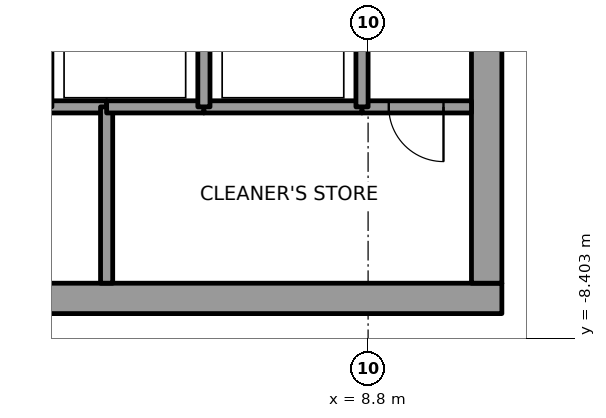
"""IFC4 building model, lengths in metres.
Left out: names, types, materials, properties, quantities, classifications, styles, units other than length and angle.
Written with IfcOpenShell. Run it as: python <this file> out.ifc"""

import sys

from ifc_helpers import new_model, si_unit, direction, frame, frame_2d, origin, place, context, subcontext, project, spatial, rectangle, extrude, element, fill, save


model = new_model("IFC4")
c1 = context("Model", 3, precision=1e-05, world=origin(), true_north=direction((0.0, 1.0)))
c2 = subcontext(c1, "Body", "Model", "MODEL_VIEW")
j1 = project(units=[si_unit("LENGTHUNIT", "METRE"), si_unit("PLANEANGLEUNIT", "RADIAN")], contexts=[c1])
p1 = place(None, origin())
s1 = spatial("IfcSite", under=j1, at=p1, CompositionType="ELEMENT")
p2 = place(p1, origin())
s2 = spatial("IfcBuilding", under=s1, at=p2, CompositionType="ELEMENT")
p3 = place(p2, frame((0.0, 0.0, 295.0)))
s3 = spatial("IfcBuildingStorey", under=s2, at=p3, CompositionType="ELEMENT", Elevation=295.0)
p4 = place(p3, frame((-11.0, -7.75, 0.0), z_axis=(0.0, 0.0, 1.0), x_axis=(1.0, 0.0, 0.0)))
e1 = element("IfcWall", 1, at=p4, inside=s3, PredefinedType="SHEAR", context=c2, shape_type="SweptSolid", body=[
    extrude(rectangle(XDim=22.0, YDim=0.5, at=frame_2d((11.0, 0.0))), origin(), (0.0, 0.0, 1.0), 4.0),
])
p5 = place(p4, frame((10.45, 0.0, 0.0)))
e2 = element("IfcOpeningElement", 2, at=p5, cuts=e1, PredefinedType="OPENING", context=c2, shape_type="SweptSolid", body=[
    extrude(rectangle(XDim=1.1, YDim=2.1, at=frame_2d((0.55, 1.05))), frame((0.0, 0.25, 0.0), z_axis=(0.0, -1.0, 0.0), x_axis=(1.0, 0.0, 0.0)), (0.0, 0.0, 1.0), 0.5),
])
p6 = place(p3, frame((10.75, -7.5, 0.0), z_axis=(0.0, 0.0, 1.0), x_axis=(0.0, 1.0, 0.0)))
e3 = element("IfcWall", 3, at=p6, inside=s3, PredefinedType="SHEAR", context=c2, shape_type="SweptSolid", body=[
    extrude(rectangle(XDim=15.0, YDim=0.5, at=frame_2d((7.5, 0.0))), origin(), (0.0, 0.0, 1.0), 4.0),
])
p7 = place(p6, frame((6.6, 0.0, 0.0)))
e4 = element("IfcOpeningElement", 4, at=p7, cuts=e3, PredefinedType="OPENING", context=c2, shape_type="SweptSolid", body=[
    extrude(rectangle(XDim=1.8, YDim=2.1, at=frame_2d((0.9, 1.05))), frame((0.0, 0.25, 0.0), z_axis=(0.0, -1.0, 0.0), x_axis=(1.0, 0.0, 0.0)), (0.0, 0.0, 1.0), 0.5),
])
p8 = place(p3, frame((4.5, -4.6, 0.0), z_axis=(0.0, 0.0, 1.0), x_axis=(-1.0, 0.0, 0.0)))
e5 = element("IfcWall", 5, at=p8, inside=s3, PredefinedType="SOLIDWALL", context=c2, shape_type="SweptSolid", body=[
    extrude(rectangle(XDim=1.0, YDim=0.2, at=frame_2d((0.5, 0.0))), origin(), (0.0, 0.0, 1.0), 3.85),
])
p9 = place(p3, frame((4.5, -4.6, 0.0), z_axis=(0.0, 0.0, 1.0), x_axis=(0.0, -1.0, 0.0)))
e6 = element("IfcWall", 6, at=p9, inside=s3, PredefinedType="SOLIDWALL", context=c2, shape_type="SweptSolid", body=[
    extrude(rectangle(XDim=2.9, YDim=0.2, at=frame_2d((1.45, 0.0))), origin(), (0.0, 0.0, 1.0), 3.85),
])
p10 = place(p3, frame((6.1, -4.6, 0.0), z_axis=(0.0, 0.0, 1.0), x_axis=(-1.0, 0.0, 0.0)))
e7 = element("IfcWall", 7, at=p10, inside=s3, PredefinedType="SOLIDWALL", context=c2, shape_type="SweptSolid", body=[
    extrude(rectangle(XDim=1.6, YDim=0.2, at=frame_2d((0.8, 0.0))), origin(), (0.0, 0.0, 1.0), 3.85),
])
p11 = place(p3, frame((8.7, -4.6, 0.0), z_axis=(0.0, 0.0, 1.0), x_axis=(-1.0, 0.0, 0.0)))
e8 = element("IfcWall", 8, at=p11, inside=s3, PredefinedType="SOLIDWALL", context=c2, shape_type="SweptSolid", body=[
    extrude(rectangle(XDim=2.6, YDim=0.2, at=frame_2d((1.3, 0.0))), origin(), (0.0, 0.0, 1.0), 3.85),
])
p12 = place(p3, frame((6.1, -4.6, 0.0), z_axis=(0.0, 0.0, 1.0), x_axis=(0.0, 1.0, 0.0)))
e9 = element("IfcWall", 9, at=p12, inside=s3, PredefinedType="SOLIDWALL", context=c2, shape_type="SweptSolid", body=[
    extrude(rectangle(XDim=2.8, YDim=0.2, at=frame_2d((1.4, 0.0))), origin(), (0.0, 0.0, 1.0), 3.85),
])
p13 = place(p3, frame((10.5, -4.6, 0.0), z_axis=(0.0, 0.0, 1.0), x_axis=(-1.0, 0.0, 0.0)))
e10 = element("IfcWall", 10, at=p13, inside=s3, PredefinedType="SOLIDWALL", context=c2, shape_type="SweptSolid", body=[
    extrude(rectangle(XDim=1.8, YDim=0.2, at=frame_2d((0.9, 0.0))), origin(), (0.0, 0.0, 1.0), 3.85),
])
p14 = place(p13, frame((0.46, 0.0, 0.0)))
e11 = element("IfcOpeningElement", 11, at=p14, cuts=e10, PredefinedType="OPENING", context=c2, shape_type="SweptSolid", body=[
    extrude(rectangle(XDim=0.9, YDim=2.1, at=frame_2d((0.45, 1.05))), frame((0.0, 0.1, 0.0), z_axis=(0.0, -1.0, 0.0), x_axis=(1.0, 0.0, 0.0)), (0.0, 0.0, 1.0), 0.2),
])
p15 = place(p3, frame((8.7, -1.8, 0.0), z_axis=(0.0, 0.0, 1.0), x_axis=(0.0, -1.0, 0.0)))
e12 = element("IfcWall", 12, at=p15, inside=s3, PredefinedType="SOLIDWALL", context=c2, shape_type="SweptSolid", body=[
    extrude(rectangle(XDim=2.8, YDim=0.2, at=frame_2d((1.4, 0.0))), origin(), (0.0, 0.0, 1.0), 3.85),
])
p16 = place(p14, origin())
e13 = element("IfcDoor", 13, at=p16, inside=s3, OperationType="SINGLE_SWING_LEFT", PredefinedType="DOOR", context=c2, shape_type="SweptSolid", body=[
    extrude(rectangle(XDim=0.9, YDim=2.1, at=frame_2d((0.45, 1.05))), frame((0.0, 0.025, 0.0), z_axis=(0.0, -1.0, 0.0), x_axis=(1.0, 0.0, 0.0)), (0.0, 0.0, 1.0), 0.05),
])
fill(e11, e13)
save(model, sys.argv[1])
